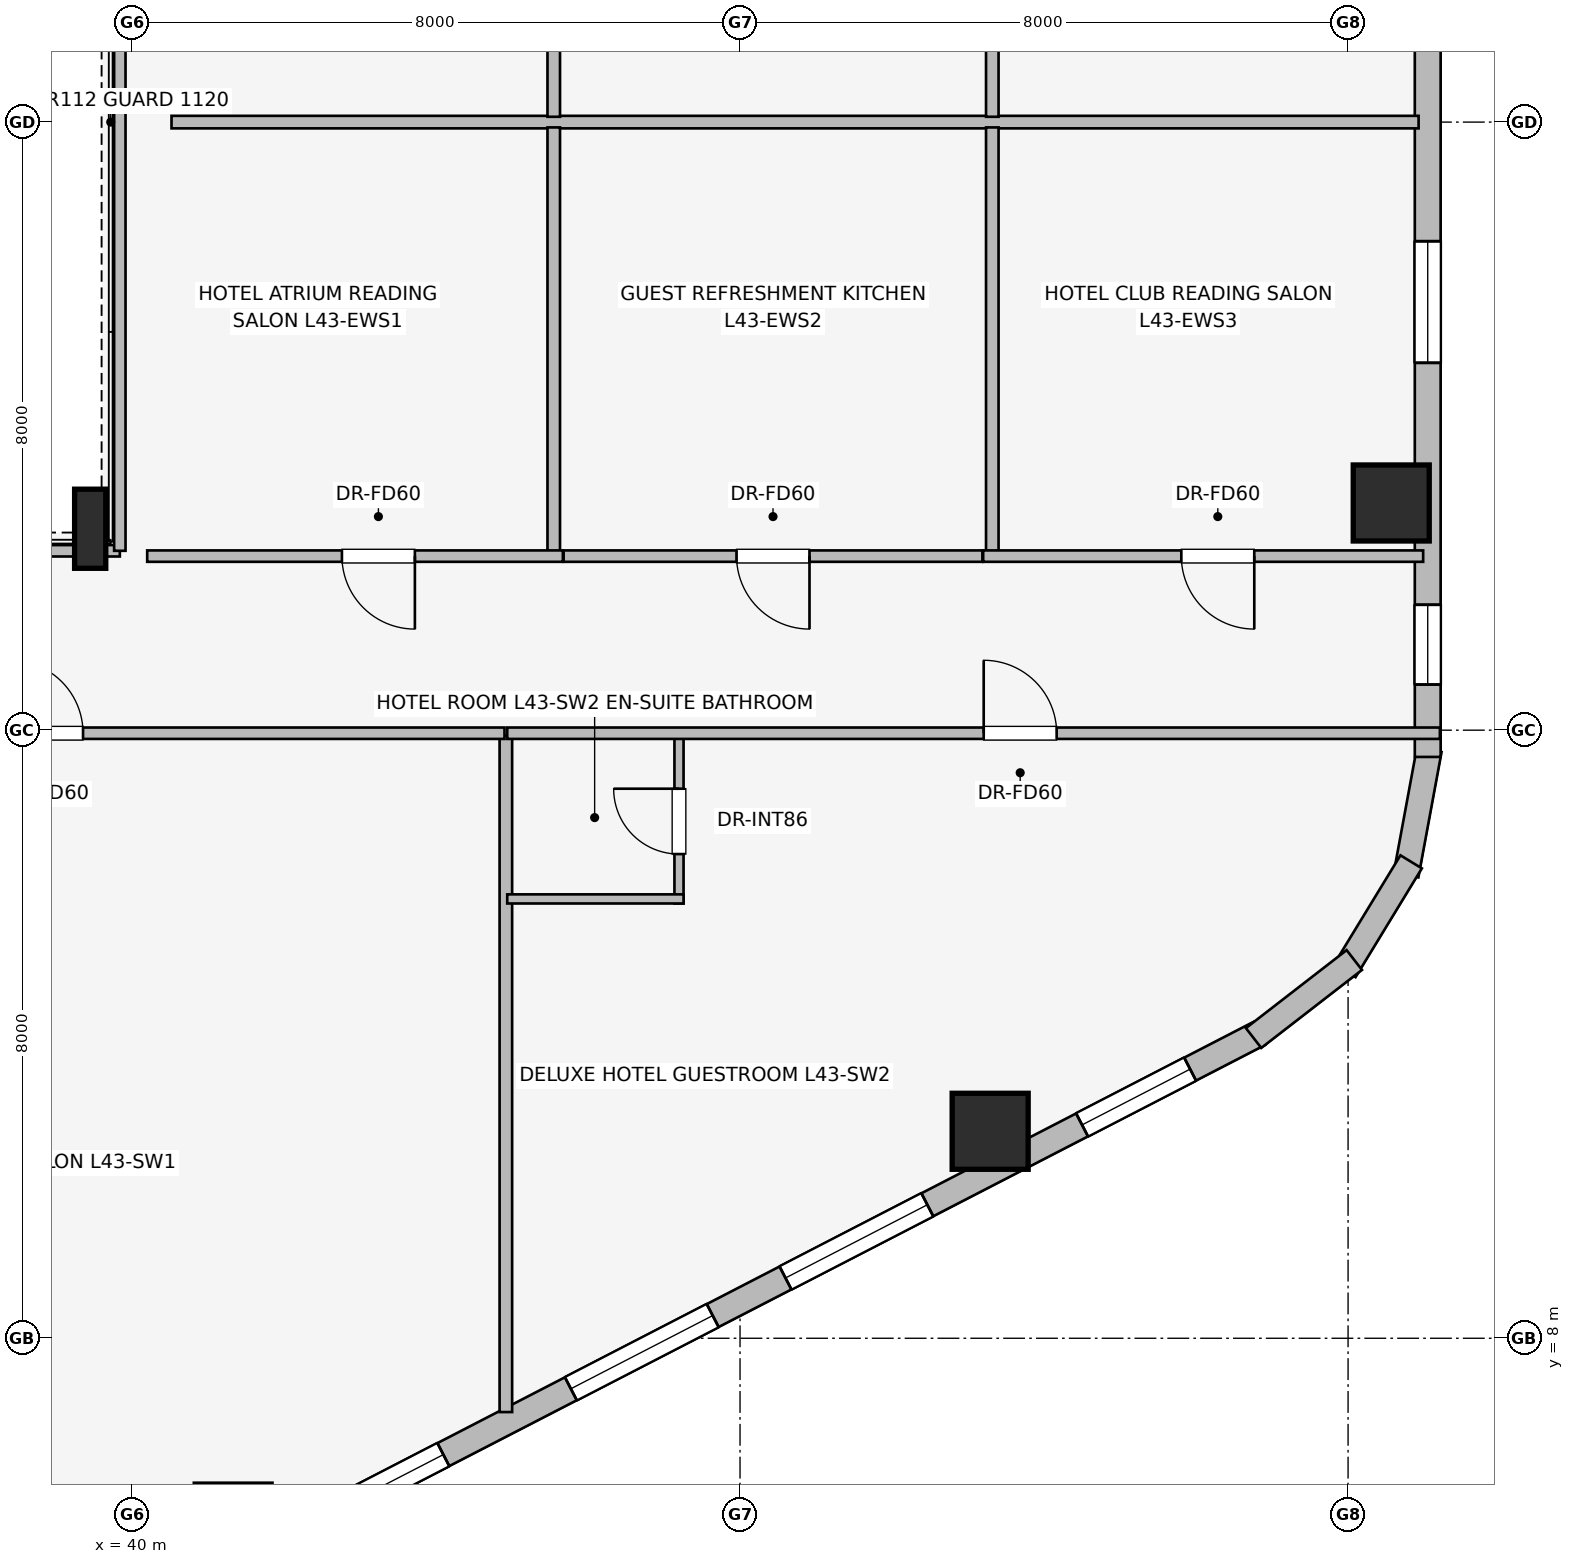
"""IFC4 building model, lengths in metres.
Left out: names, types, materials, properties, quantities, classifications, styles, units other than length and angle.
Written with IfcOpenShell. Run it as: python <this file> out.ifc"""

import sys

from ifc_helpers import new_model, si_unit, direction, frame, frame_2d, origin, origin_2d, place, context, subcontext, project, spatial, rectangle, i_section, extrude, element, fill, save


model = new_model("IFC4")
c1 = context("Model", 3, precision=1e-05, world=origin(), true_north=direction((0.0, 1.0)))
c2 = subcontext(c1, "Body", "Model", "MODEL_VIEW")
j1 = project(units=[si_unit("LENGTHUNIT", "METRE"), si_unit("PLANEANGLEUNIT", "RADIAN")], contexts=[c1])
p1 = place(None, origin())
s1 = spatial("IfcSite", under=j1, at=p1, CompositionType="ELEMENT")
p2 = place(p1, origin())
s2 = spatial("IfcBuilding", under=s1, at=p2, CompositionType="ELEMENT")
p3 = place(p2, frame((0.0, 0.0, 160.2)))
s3 = spatial("IfcBuildingStorey", under=s2, at=p3, CompositionType="ELEMENT", Elevation=160.2)
for number, where, z_axis, x_axis in (
    (1, (51.291, 10.723, 0.0), (0.0, 0.0, 1.0), (1.0, 0.0, 0.0)),
    (2, (56.568, 18.989, 0.0), (0.0, 0.0, 1.0), (1.0, 0.0, 0.0)),
):
    element("IfcColumn", number, at=place(p3, frame(where, z_axis=z_axis, x_axis=x_axis)), inside=s3, PredefinedType="COLUMN", context=c2, shape_type="SweptSolid", body=[
        extrude(rectangle(XDim=1.0, YDim=1.0, at=origin_2d()), origin(), (0.0, 0.0, 1.0), 3.45),
    ])
p4 = place(p3, frame((39.45, 18.65, 0.0), z_axis=(0.0, 0.0, 1.0), x_axis=(1.0, 0.0, 0.0)))
e3 = element("IfcColumn", 3, at=p4, inside=s3, PredefinedType="COLUMN", context=c2, shape_type="SweptSolid", body=[
    extrude(i_section(OverallWidth=0.41, OverallDepth=1.041, WebThickness=0.031, FlangeThickness=0.056, at=origin_2d()), origin(), (0.0, 0.0, 1.0), 3.45),
])
p5 = place(p3, frame((54.831, 12.01, 0.0), z_axis=(0.0, 0.0, 1.0), x_axis=(-0.888613612362, -0.458656568606, 0.0)))
e4 = element("IfcWall", 4, at=p5, inside=s3, PredefinedType="STANDARD", context=c2, shape_type="SweptSolid", body=[
    extrude(rectangle(XDim=18.681, YDim=0.34, at=frame_2d((9.34, 0.0))), origin(), (0.0, 0.0, 1.0), 3.03),
])
p6 = place(p5, frame((1.023, 0.0, 0.75)))
e5 = element("IfcOpeningElement", 5, at=p6, cuts=e4, PredefinedType="OPENING", context=c2, shape_type="SweptSolid", body=[
    extrude(rectangle(XDim=1.6, YDim=1.55, at=frame_2d((0.8, 0.775))), frame((0.0, 0.18, 0.0), z_axis=(0.0, -1.0, 0.0), x_axis=(1.0, 0.0, 0.0)), (0.0, 0.0, 1.0), 0.36),
])
p7 = place(p5, frame((4.914, 0.0, 0.75)))
e6 = element("IfcOpeningElement", 6, at=p7, cuts=e4, PredefinedType="OPENING", context=c2, shape_type="SweptSolid", body=[
    extrude(rectangle(XDim=2.1, YDim=1.5, at=frame_2d((1.05, 0.75))), frame((0.0, 0.18, 0.0), z_axis=(0.0, -1.0, 0.0), x_axis=(1.0, 0.0, 0.0)), (0.0, 0.0, 1.0), 0.36),
])
p8 = place(p5, frame((8.092, 0.0, 0.75)))
e7 = element("IfcOpeningElement", 7, at=p8, cuts=e4, PredefinedType="OPENING", context=c2, shape_type="SweptSolid", body=[
    extrude(rectangle(XDim=2.1, YDim=1.5, at=frame_2d((1.05, 0.75))), frame((0.0, 0.18, 0.0), z_axis=(0.0, -1.0, 0.0), x_axis=(1.0, 0.0, 0.0)), (0.0, 0.0, 1.0), 0.36),
])
p9 = place(p5, frame((12.08, 0.0, 0.75)))
e8 = element("IfcOpeningElement", 8, at=p9, cuts=e4, PredefinedType="OPENING", context=c2, shape_type="SweptSolid", body=[
    extrude(rectangle(XDim=1.6, YDim=1.55, at=frame_2d((0.8, 0.775))), frame((0.0, 0.18, 0.0), z_axis=(0.0, -1.0, 0.0), x_axis=(1.0, 0.0, 0.0)), (0.0, 0.0, 1.0), 0.36),
])
p10 = place(p5, frame((15.808, 0.0, 0.75)))
e9 = element("IfcOpeningElement", 9, at=p10, cuts=e4, PredefinedType="OPENING", context=c2, shape_type="SweptSolid", body=[
    extrude(rectangle(XDim=2.1, YDim=1.5, at=frame_2d((1.05, 0.75))), frame((0.0, 0.18, 0.0), z_axis=(0.0, -1.0, 0.0), x_axis=(1.0, 0.0, 0.0)), (0.0, 0.0, 1.0), 0.36),
])
p11 = place(p3, frame((57.068, 15.742, 0.0), z_axis=(0.0, 0.0, 1.0), x_axis=(-0.181984991895, -0.983301308209, 0.0)))
e10 = element("IfcWall", 10, at=p11, inside=s3, PredefinedType="STANDARD", context=c2, shape_type="SweptSolid", body=[
    extrude(rectangle(XDim=1.677, YDim=0.33, at=frame_2d((0.838, 0.0))), origin(), (0.0, 0.0, 1.0), 3.03),
])
p12 = place(p3, frame((56.83, 14.268, 0.0), z_axis=(0.0, 0.0, 1.0), x_axis=(-0.520519429557, -0.853849824883, 0.0)))
e11 = element("IfcWall", 11, at=p12, inside=s3, PredefinedType="STANDARD", context=c2, shape_type="SweptSolid", body=[
    extrude(rectangle(XDim=1.677, YDim=0.33, at=frame_2d((0.839, 0.0))), origin(), (0.0, 0.0, 1.0), 3.03),
])
p13 = place(p3, frame((56.082, 12.976, 0.0), z_axis=(0.0, 0.0, 1.0), x_axis=(-0.790621329885, -0.612305408053, 0.0)))
e12 = element("IfcWall", 12, at=p13, inside=s3, PredefinedType="STANDARD", context=c2, shape_type="SweptSolid", body=[
    extrude(rectangle(XDim=1.676, YDim=0.33, at=frame_2d((0.838, 0.0))), origin(), (0.0, 0.0, 1.0), 3.03),
])
p14 = place(p3, frame((57.048, 32.352, 0.0), z_axis=(0.0, 0.0, 1.0), x_axis=(0.0, -1.0, 0.0)))
e13 = element("IfcWall", 13, at=p14, inside=s3, PredefinedType="STANDARD", context=c2, shape_type="SweptSolid", body=[
    extrude(rectangle(XDim=16.704, YDim=0.34, at=frame_2d((8.352, 0.0))), origin(), (0.0, 0.0, 1.0), 3.03),
])
p15 = place(p14, frame((0.992, 0.0, 0.75)))
e14 = element("IfcOpeningElement", 14, at=p15, cuts=e13, PredefinedType="OPENING", context=c2, shape_type="SweptSolid", body=[
    extrude(rectangle(XDim=1.05, YDim=1.4, at=frame_2d((0.525, 0.7))), frame((0.0, 0.18, 0.0), z_axis=(0.0, -1.0, 0.0), x_axis=(1.0, 0.0, 0.0)), (0.0, 0.0, 1.0), 0.36),
])
p16 = place(p14, frame((4.935, 0.0, 0.75)))
e15 = element("IfcOpeningElement", 15, at=p16, cuts=e13, PredefinedType="OPENING", context=c2, shape_type="SweptSolid", body=[
    extrude(rectangle(XDim=2.1, YDim=1.5, at=frame_2d((1.05, 0.75))), frame((0.0, 0.18, 0.0), z_axis=(0.0, -1.0, 0.0), x_axis=(1.0, 0.0, 0.0)), (0.0, 0.0, 1.0), 0.36),
])
p17 = place(p14, frame((9.919, 0.0, 0.75)))
e16 = element("IfcOpeningElement", 16, at=p17, cuts=e13, PredefinedType="OPENING", context=c2, shape_type="SweptSolid", body=[
    extrude(rectangle(XDim=1.6, YDim=1.55, at=frame_2d((0.8, 0.775))), frame((0.0, 0.18, 0.0), z_axis=(0.0, -1.0, 0.0), x_axis=(1.0, 0.0, 0.0)), (0.0, 0.0, 1.0), 0.36),
])
p18 = place(p14, frame((14.702, 0.0, 0.75)))
e17 = element("IfcOpeningElement", 17, at=p18, cuts=e13, PredefinedType="OPENING", context=c2, shape_type="SweptSolid", body=[
    extrude(rectangle(XDim=1.05, YDim=1.4, at=frame_2d((0.525, 0.7))), frame((0.0, 0.18, 0.0), z_axis=(0.0, -1.0, 0.0), x_axis=(1.0, 0.0, 0.0)), (0.0, 0.0, 1.0), 0.36),
])
p19 = place(p3, frame((27.675, 18.36, 0.0), z_axis=(0.0, 0.0, 1.0), x_axis=(1.0, 0.0, 0.0)))
e18 = element("IfcWall", 18, at=p19, inside=s3, PredefinedType="PARTITIONING", context=c2, shape_type="SweptSolid", body=[
    extrude(rectangle(XDim=12.165, YDim=0.15, at=frame_2d((6.083, 0.0))), origin(), (0.0, 0.0, 1.0), 2.022),
])
p20 = place(p3, frame((39.84, 18.36, 0.0), z_axis=(0.0, 0.0, 1.0), x_axis=(0.0, 1.0, 0.0)))
e19 = element("IfcWall", 19, at=p20, inside=s3, PredefinedType="PARTITIONING", context=c2, shape_type="SweptSolid", body=[
    extrude(rectangle(XDim=11.28, YDim=0.15, at=frame_2d((5.64, 0.0))), origin(), (0.0, 0.0, 1.0), 2.022),
])
p21 = place(p3, frame((40.52, 24.0, 0.0), z_axis=(0.0, 0.0, 1.0), x_axis=(1.0, 0.0, 0.0)))
e20 = element("IfcWall", 20, at=p21, inside=s3, PredefinedType="PARTITIONING", context=c2, shape_type="SweptSolid", body=[
    extrude(rectangle(XDim=16.408, YDim=0.165, at=frame_2d((8.204, 0.0))), origin(), (0.0, 0.0, 1.0), 3.03),
])
for number, where, z_axis, x_axis in (
    (21, (45.549, 24.07, 0.0), (0.0, 0.0, 1.0), (0.0, 1.0, 0.0)),
    (22, (51.319, 24.07, 0.0), (0.0, 0.0, 1.0), (0.0, 1.0, 0.0)),
    (23, (45.549, 18.29, 0.0), (0.0, 0.0, 1.0), (0.0, 1.0, 0.0)),
    (24, (51.319, 18.29, 0.0), (0.0, 0.0, 1.0), (0.0, 1.0, 0.0)),
):
    element("IfcWall", number, at=place(p3, frame(where, z_axis=z_axis, x_axis=x_axis)), inside=s3, PredefinedType="PARTITIONING", context=c2, shape_type="SweptSolid", body=[
        extrude(rectangle(XDim=5.64, YDim=0.165, at=frame_2d((2.82, 0.0))), origin(), (0.0, 0.0, 1.0), 3.03),
    ])
p22 = place(p3, frame((45.669, 18.29, 0.0), z_axis=(0.0, 0.0, 1.0), x_axis=(-1.0, 0.0, 0.0)))
e25 = element("IfcWall", 25, at=p22, inside=s3, PredefinedType="PARTITIONING", context=c2, shape_type="SweptSolid", body=[
    extrude(rectangle(XDim=5.469, YDim=0.15, at=frame_2d((2.734, 0.0))), origin(), (0.0, 0.0, 1.0), 2.022),
])
p23 = place(p22, frame((1.947, 0.0, 0.0)))
e26 = element("IfcOpeningElement", 26, at=p23, cuts=e25, PredefinedType="OPENING", context=c2, shape_type="SweptSolid", body=[
    extrude(rectangle(XDim=0.96, YDim=2.0, at=frame_2d((0.48, 1.0))), frame((0.0, 0.085, 0.0), z_axis=(0.0, -1.0, 0.0), x_axis=(1.0, 0.0, 0.0)), (0.0, 0.0, 1.0), 0.17),
])
p24 = place(p3, frame((51.189, 18.29, 0.0), z_axis=(0.0, 0.0, 1.0), x_axis=(-1.0, 0.0, 0.0)))
e27 = element("IfcWall", 27, at=p24, inside=s3, PredefinedType="PARTITIONING", context=c2, shape_type="SweptSolid", body=[
    extrude(rectangle(XDim=5.51, YDim=0.15, at=frame_2d((2.755, 0.0))), origin(), (0.0, 0.0, 1.0), 3.03),
])
p25 = place(p24, frame((2.275, 0.0, 0.0)))
e28 = element("IfcOpeningElement", 28, at=p25, cuts=e27, PredefinedType="OPENING", context=c2, shape_type="SweptSolid", body=[
    extrude(rectangle(XDim=0.96, YDim=2.0, at=frame_2d((0.48, 1.0))), frame((0.0, 0.085, 0.0), z_axis=(0.0, -1.0, 0.0), x_axis=(1.0, 0.0, 0.0)), (0.0, 0.0, 1.0), 0.17),
])
p26 = place(p3, frame((56.988, 18.29, 0.0), z_axis=(0.0, 0.0, 1.0), x_axis=(-1.0, 0.0, 0.0)))
e29 = element("IfcWall", 29, at=p26, inside=s3, PredefinedType="PARTITIONING", context=c2, shape_type="SweptSolid", body=[
    extrude(rectangle(XDim=5.789, YDim=0.15, at=frame_2d((2.895, 0.0))), origin(), (0.0, 0.0, 1.0), 3.03),
])
p27 = place(p26, frame((2.222, 0.0, 0.0)))
e30 = element("IfcOpeningElement", 30, at=p27, cuts=e29, PredefinedType="OPENING", context=c2, shape_type="SweptSolid", body=[
    extrude(rectangle(XDim=0.96, YDim=2.0, at=frame_2d((0.48, 1.0))), frame((0.0, 0.085, 0.0), z_axis=(0.0, -1.0, 0.0), x_axis=(1.0, 0.0, 0.0)), (0.0, 0.0, 1.0), 0.17),
])
p28 = place(p3, frame((44.919, 7.029, 0.0), z_axis=(0.0, 0.0, 1.0), x_axis=(0.0, 1.0, 0.0)))
e31 = element("IfcWall", 31, at=p28, inside=s3, PredefinedType="PARTITIONING", context=c2, shape_type="SweptSolid", body=[
    extrude(rectangle(XDim=8.901, YDim=0.165, at=frame_2d((4.45, 0.0))), origin(), (0.0, 0.0, 1.0), 3.03),
])
p29 = place(p3, frame((32.85, 15.96, 0.0), z_axis=(0.0, 0.0, 1.0), x_axis=(1.0, 0.0, 0.0)))
e32 = element("IfcWall", 32, at=p29, inside=s3, PredefinedType="PARTITIONING", context=c2, shape_type="SweptSolid", body=[
    extrude(rectangle(XDim=12.051, YDim=0.15, at=frame_2d((6.025, 0.0))), origin(), (0.0, 0.0, 1.0), 3.03),
])
p30 = place(p29, frame((5.546, 0.0, 0.0)))
e33 = element("IfcOpeningElement", 33, at=p30, cuts=e32, PredefinedType="OPENING", context=c2, shape_type="SweptSolid", body=[
    extrude(rectangle(XDim=0.96, YDim=2.0, at=frame_2d((0.48, 1.0))), frame((0.0, 0.085, 0.0), z_axis=(0.0, -1.0, 0.0), x_axis=(1.0, 0.0, 0.0)), (0.0, 0.0, 1.0), 0.17),
])
p31 = place(p3, frame((47.197, 13.72, 0.0), z_axis=(0.0, 0.0, 1.0), x_axis=(0.0, 1.0, 0.0)))
e34 = element("IfcWall", 34, at=p31, inside=s3, PredefinedType="PARTITIONING", context=c2, shape_type="SweptSolid", body=[
    extrude(rectangle(XDim=2.24, YDim=0.12, at=frame_2d((1.12, 0.0))), origin(), (0.0, 0.0, 1.0), 3.03),
])
p32 = place(p31, frame((0.65, 0.0, 0.0)))
e35 = element("IfcOpeningElement", 35, at=p32, cuts=e34, PredefinedType="OPENING", context=c2, shape_type="SweptSolid", body=[
    extrude(rectangle(XDim=0.86, YDim=2.0, at=frame_2d((0.43, 1.0))), frame((0.0, 0.07, 0.0), z_axis=(0.0, -1.0, 0.0), x_axis=(1.0, 0.0, 0.0)), (0.0, 0.0, 1.0), 0.14),
])
p33 = place(p3, frame((44.937, 13.78, 0.0), z_axis=(0.0, 0.0, 1.0), x_axis=(1.0, 0.0, 0.0)))
e36 = element("IfcWall", 36, at=p33, inside=s3, PredefinedType="PARTITIONING", context=c2, shape_type="SweptSolid", body=[
    extrude(rectangle(XDim=2.32, YDim=0.12, at=frame_2d((1.16, 0.0))), origin(), (0.0, 0.0, 1.0), 3.03),
])
p34 = place(p3, frame((44.937, 15.96, 0.0), z_axis=(0.0, 0.0, 1.0), x_axis=(1.0, 0.0, 0.0)))
e37 = element("IfcWall", 37, at=p34, inside=s3, PredefinedType="PARTITIONING", context=c2, shape_type="SweptSolid", body=[
    extrude(rectangle(XDim=12.271, YDim=0.15, at=frame_2d((6.135, 0.0))), origin(), (0.0, 0.0, 1.0), 3.03),
])
p35 = place(p34, frame((6.269, 0.0, 0.0)))
e38 = element("IfcOpeningElement", 38, at=p35, cuts=e37, PredefinedType="OPENING", context=c2, shape_type="SweptSolid", body=[
    extrude(rectangle(XDim=0.96, YDim=2.0, at=frame_2d((0.48, 1.0))), frame((0.0, 0.085, 0.0), z_axis=(0.0, -1.0, 0.0), x_axis=(1.0, 0.0, 0.0)), (0.0, 0.0, 1.0), 0.17),
])
p36 = place(p6, origin())
e39 = element("IfcWindow", 39, at=p36, inside=s3, PartitioningType="SINGLE_PANEL", PredefinedType="WINDOW", context=c2, shape_type="SweptSolid", body=[
    extrude(rectangle(XDim=1.6, YDim=1.55, at=frame_2d((0.8, 0.775))), frame((0.0, 0.03, 0.0), z_axis=(0.0, -1.0, 0.0), x_axis=(1.0, 0.0, 0.0)), (0.0, 0.0, 1.0), 0.06),
])
fill(e5, e39)
p37 = place(p7, origin())
e40 = element("IfcWindow", 40, at=p37, inside=s3, PartitioningType="SINGLE_PANEL", PredefinedType="WINDOW", context=c2, shape_type="SweptSolid", body=[
    extrude(rectangle(XDim=2.1, YDim=1.5, at=frame_2d((1.05, 0.75))), frame((0.0, 0.03, 0.0), z_axis=(0.0, -1.0, 0.0), x_axis=(1.0, 0.0, 0.0)), (0.0, 0.0, 1.0), 0.06),
])
fill(e6, e40)
p38 = place(p8, origin())
e41 = element("IfcWindow", 41, at=p38, inside=s3, PartitioningType="SINGLE_PANEL", PredefinedType="WINDOW", context=c2, shape_type="SweptSolid", body=[
    extrude(rectangle(XDim=2.1, YDim=1.5, at=frame_2d((1.05, 0.75))), frame((0.0, 0.03, 0.0), z_axis=(0.0, -1.0, 0.0), x_axis=(1.0, 0.0, 0.0)), (0.0, 0.0, 1.0), 0.06),
])
fill(e7, e41)
p39 = place(p9, origin())
e42 = element("IfcWindow", 42, at=p39, inside=s3, PartitioningType="SINGLE_PANEL", PredefinedType="WINDOW", context=c2, shape_type="SweptSolid", body=[
    extrude(rectangle(XDim=1.6, YDim=1.55, at=frame_2d((0.8, 0.775))), frame((0.0, 0.03, 0.0), z_axis=(0.0, -1.0, 0.0), x_axis=(1.0, 0.0, 0.0)), (0.0, 0.0, 1.0), 0.06),
])
fill(e8, e42)
p40 = place(p17, origin())
e43 = element("IfcWindow", 43, at=p40, inside=s3, PartitioningType="SINGLE_PANEL", PredefinedType="WINDOW", context=c2, shape_type="SweptSolid", body=[
    extrude(rectangle(XDim=1.6, YDim=1.55, at=frame_2d((0.8, 0.775))), frame((0.0, 0.03, 0.0), z_axis=(0.0, -1.0, 0.0), x_axis=(1.0, 0.0, 0.0)), (0.0, 0.0, 1.0), 0.06),
])
fill(e16, e43)
p41 = place(p18, origin())
e44 = element("IfcWindow", 44, at=p41, inside=s3, PartitioningType="SINGLE_PANEL", PredefinedType="WINDOW", context=c2, shape_type="SweptSolid", body=[
    extrude(rectangle(XDim=1.05, YDim=1.4, at=frame_2d((0.525, 0.7))), frame((0.0, 0.03, 0.0), z_axis=(0.0, -1.0, 0.0), x_axis=(1.0, 0.0, 0.0)), (0.0, 0.0, 1.0), 0.06),
])
fill(e17, e44)
p42 = place(p23, origin())
e45 = element("IfcDoor", 45, at=p42, inside=s3, OperationType="SINGLE_SWING_LEFT", PredefinedType="DOOR", context=c2, shape_type="SweptSolid", body=[
    extrude(rectangle(XDim=0.96, YDim=2.0, at=frame_2d((0.48, 1.0))), frame((0.0, 0.025, 0.0), z_axis=(0.0, -1.0, 0.0), x_axis=(1.0, 0.0, 0.0)), (0.0, 0.0, 1.0), 0.05),
])
fill(e26, e45)
p43 = place(p25, origin())
e46 = element("IfcDoor", 46, at=p43, inside=s3, OperationType="SINGLE_SWING_LEFT", PredefinedType="DOOR", context=c2, shape_type="SweptSolid", body=[
    extrude(rectangle(XDim=0.96, YDim=2.0, at=frame_2d((0.48, 1.0))), frame((0.0, 0.025, 0.0), z_axis=(0.0, -1.0, 0.0), x_axis=(1.0, 0.0, 0.0)), (0.0, 0.0, 1.0), 0.05),
])
fill(e28, e46)
p44 = place(p27, origin())
e47 = element("IfcDoor", 47, at=p44, inside=s3, OperationType="SINGLE_SWING_LEFT", PredefinedType="DOOR", context=c2, shape_type="SweptSolid", body=[
    extrude(rectangle(XDim=0.96, YDim=2.0, at=frame_2d((0.48, 1.0))), frame((0.0, 0.025, 0.0), z_axis=(0.0, -1.0, 0.0), x_axis=(1.0, 0.0, 0.0)), (0.0, 0.0, 1.0), 0.05),
])
fill(e30, e47)
p45 = place(p30, origin())
e48 = element("IfcDoor", 48, at=p45, inside=s3, OperationType="SINGLE_SWING_LEFT", PredefinedType="DOOR", context=c2, shape_type="SweptSolid", body=[
    extrude(rectangle(XDim=0.96, YDim=2.0, at=frame_2d((0.48, 1.0))), frame((0.0, 0.025, 0.0), z_axis=(0.0, -1.0, 0.0), x_axis=(1.0, 0.0, 0.0)), (0.0, 0.0, 1.0), 0.05),
])
fill(e33, e48)
p46 = place(p32, origin())
e49 = element("IfcDoor", 49, at=p46, inside=s3, OperationType="SINGLE_SWING_RIGHT", PredefinedType="DOOR", context=c2, shape_type="SweptSolid", body=[
    extrude(rectangle(XDim=0.86, YDim=2.0, at=frame_2d((0.43, 1.0))), frame((0.0, 0.025, 0.0), z_axis=(0.0, -1.0, 0.0), x_axis=(1.0, 0.0, 0.0)), (0.0, 0.0, 1.0), 0.05),
])
fill(e35, e49)
p47 = place(p35, origin())
e50 = element("IfcDoor", 50, at=p47, inside=s3, OperationType="SINGLE_SWING_LEFT", PredefinedType="DOOR", context=c2, shape_type="SweptSolid", body=[
    extrude(rectangle(XDim=0.96, YDim=2.0, at=frame_2d((0.48, 1.0))), frame((0.0, 0.025, 0.0), z_axis=(0.0, -1.0, 0.0), x_axis=(1.0, 0.0, 0.0)), (0.0, 0.0, 1.0), 0.05),
])
fill(e38, e50)
save(model, sys.argv[1])
